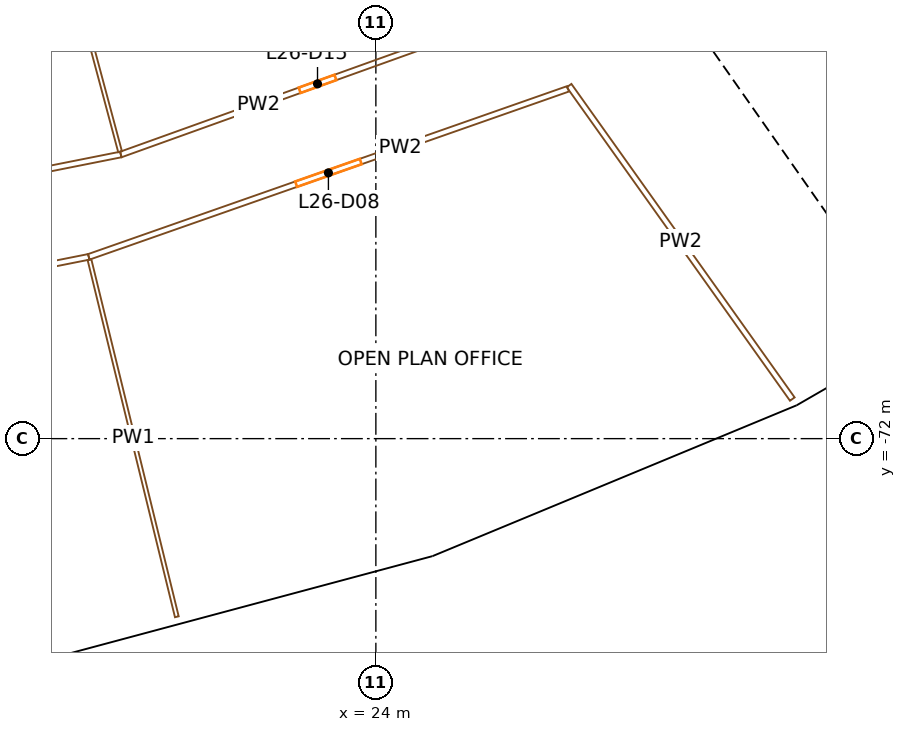
"""IFC4 building model, lengths in metres.
Left out: names, types, materials, properties, quantities, classifications, styles, units other than length and angle.
Written with IfcOpenShell. Run it as: python <this file> out.ifc"""

import sys

from ifc_helpers import new_model, si_unit, direction, frame, frame_2d, origin, origin_2d, place, context, subcontext, project, spatial, rectangle, extrude, element, fill, save


model = new_model("IFC4")
c1 = context("Model", 3, precision=1e-05, world=origin(), true_north=direction((0.0, 1.0)))
c2 = subcontext(c1, "Body", "Model", "MODEL_VIEW")
j1 = project(units=[si_unit("LENGTHUNIT", "METRE"), si_unit("PLANEANGLEUNIT", "RADIAN")], contexts=[c1])
p1 = place(None, origin())
s1 = spatial("IfcSite", under=j1, at=p1, CompositionType="ELEMENT")
p2 = place(p1, origin())
s2 = spatial("IfcBuilding", under=s1, at=p2, CompositionType="ELEMENT")
p3 = place(p2, frame((0.0, 0.0, 117.7)))
s3 = spatial("IfcBuildingStorey", under=s2, at=p3, CompositionType="ELEMENT", Elevation=117.7)
for number, where, z_axis, x_axis in (
    (1, (15.168, -76.256, 0.0), (0.0, 0.0, 1.0), (0.981, 0.195, 0.0)),
    (2, (24.992, -73.624, 0.0), (0.0, 0.0, 1.0), (0.947, 0.321, 0.0)),
    (3, (34.388, -69.732, 0.0), (0.0, 0.0, 1.0), (0.897, 0.442, 0.0)),
):
    element("IfcColumn", number, at=place(p3, frame(where, z_axis=z_axis, x_axis=x_axis)), inside=s3, PredefinedType="COLUMN", context=c2, shape_type="SweptSolid", body=[
        extrude(rectangle(XDim=1.2, YDim=1.5, at=origin_2d()), origin(), (0.0, 0.0, 1.0), 3.8),
    ])
p4 = place(p3, frame((36.717, -66.337, 0.0), z_axis=(0.0, 0.0, 1.0), x_axis=(-0.573577477574, 0.819151315216, 0.0)))
e4 = element("IfcWall", 4, at=p4, inside=s3, PredefinedType="SHEAR", context=c2, shape_type="SweptSolid", body=[
    extrude(rectangle(XDim=14.8, YDim=0.9, at=frame_2d((7.4, 0.0))), origin(), (0.0, 0.0, 1.0), 3.5),
])
p5 = place(p4, frame((6.2, 0.0, 0.0)))
e5 = element("IfcOpeningElement", 5, at=p5, cuts=e4, PredefinedType="OPENING", context=c2, shape_type="SweptSolid", body=[
    extrude(rectangle(XDim=2.4, YDim=2.1, at=frame_2d((1.2, 1.05))), frame((0.0, 0.46, 0.0), z_axis=(0.0, -1.0, 0.0), x_axis=(1.0, 0.0, 0.0)), (0.0, 0.0, 1.0), 0.92),
])
p6 = place(p3, frame((35.221, -63.417, 0.0), z_axis=(0.0, 0.0, 1.0), x_axis=(0.819166993208, 0.573555086491, 0.0)))
e6 = element("IfcWall", 6, at=p6, inside=s3, PredefinedType="SOLIDWALL", context=c2, shape_type="SweptSolid", body=[
    extrude(rectangle(XDim=7.95, YDim=0.3, at=frame_2d((3.975, 0.0))), origin(), (0.0, 0.0, 1.0), 3.5),
])
p7 = place(p3, frame((8.719, -66.229, 0.0), z_axis=(0.0, 0.0, 1.0), x_axis=(0.980786466832, 0.195084357342, 0.0)))
e7 = element("IfcWall", 7, at=p7, inside=s3, PredefinedType="PARTITIONING", context=c2, shape_type="SweptSolid", body=[
    extrude(rectangle(XDim=8.738, YDim=0.15, at=frame_2d((4.369, 0.0))), origin(), (0.0, 0.0, 1.0), 2.4),
])
p8 = place(p7, frame((3.869, 0.0, 0.0)))
e8 = element("IfcOpeningElement", 8, at=p8, cuts=e7, PredefinedType="OPENING", context=c2, shape_type="SweptSolid", body=[
    extrude(rectangle(XDim=1.0, YDim=2.1, at=frame_2d((0.5, 1.05))), frame((0.0, 0.085, 0.0), z_axis=(0.0, -1.0, 0.0), x_axis=(1.0, 0.0, 0.0)), (0.0, 0.0, 1.0), 0.17),
])
p9 = place(p3, frame((16.446, -67.217, 0.0), z_axis=(0.0, 0.0, 1.0), x_axis=(-0.980785582749, -0.195088802015, 0.0)))
e9 = element("IfcWall", 9, at=p9, inside=s3, PredefinedType="PARTITIONING", context=c2, shape_type="SweptSolid", body=[
    extrude(rectangle(XDim=6.033, YDim=0.15, at=frame_2d((3.017, 0.0))), origin(), (0.0, 0.0, 1.0), 2.4),
])
p10 = place(p9, frame((2.517, 0.0, 0.0)))
e10 = element("IfcOpeningElement", 10, at=p10, cuts=e9, PredefinedType="OPENING", context=c2, shape_type="SweptSolid", body=[
    extrude(rectangle(XDim=1.0, YDim=2.1, at=frame_2d((0.5, 1.05))), frame((0.0, 0.085, 0.0), z_axis=(0.0, -1.0, 0.0), x_axis=(1.0, 0.0, 0.0)), (0.0, 0.0, 1.0), 0.17),
])
p11 = place(p3, frame((14.747, -55.037, 0.0), z_axis=(0.0, 0.0, 1.0), x_axis=(0.258833329344, -0.965921998725, 0.0)))
e11 = element("IfcWall", 11, at=p11, inside=s3, PredefinedType="PARTITIONING", context=c2, shape_type="SweptSolid", body=[
    extrude(rectangle(XDim=9.746, YDim=0.1, at=frame_2d((4.873, 0.0))), origin(), (0.0, 0.0, 1.0), 2.4),
])
p12 = place(p3, frame((29.057, -62.796, 0.0), z_axis=(0.0, 0.0, 1.0), x_axis=(-0.943684765834, -0.330845980378, 0.0)))
e12 = element("IfcWall", 12, at=p12, inside=s3, PredefinedType="PARTITIONING", context=c2, shape_type="SweptSolid", body=[
    extrude(rectangle(XDim=13.363, YDim=0.15, at=frame_2d((6.682, 0.0))), origin(), (0.0, 0.0, 1.0), 2.4),
])
p13 = place(p12, frame((5.782, 0.0, 0.0)))
e13 = element("IfcOpeningElement", 13, at=p13, cuts=e12, PredefinedType="OPENING", context=c2, shape_type="SweptSolid", body=[
    extrude(rectangle(XDim=1.8, YDim=2.1, at=frame_2d((0.9, 1.05))), frame((0.0, 0.085, 0.0), z_axis=(0.0, -1.0, 0.0), x_axis=(1.0, 0.0, 0.0)), (0.0, 0.0, 1.0), 0.17),
])
p14 = place(p3, frame((17.289, -64.524, 0.0), z_axis=(0.0, 0.0, 1.0), x_axis=(0.941150861554, 0.337986768669, 0.0)))
e14 = element("IfcWall", 14, at=p14, inside=s3, PredefinedType="PARTITIONING", context=c2, shape_type="SweptSolid", body=[
    extrude(rectangle(XDim=10.998, YDim=0.15, at=frame_2d((5.499, 0.0))), origin(), (0.0, 0.0, 1.0), 2.4),
])
p15 = place(p14, frame((4.999, 0.0, 0.0)))
e15 = element("IfcOpeningElement", 15, at=p15, cuts=e14, PredefinedType="OPENING", context=c2, shape_type="SweptSolid", body=[
    extrude(rectangle(XDim=1.0, YDim=2.1, at=frame_2d((0.5, 1.05))), frame((0.0, 0.085, 0.0), z_axis=(0.0, -1.0, 0.0), x_axis=(1.0, 0.0, 0.0)), (0.0, 0.0, 1.0), 0.17),
])
p16 = place(p3, frame((18.763, -76.687, 0.0), z_axis=(0.0, 0.0, 1.0), x_axis=(-0.237657357205, 0.971349051869, 0.0)))
e16 = element("IfcWall", 16, at=p16, inside=s3, PredefinedType="PARTITIONING", context=c2, shape_type="SweptSolid", body=[
    extrude(rectangle(XDim=9.674, YDim=0.1, at=frame_2d((4.837, 0.0))), origin(), (0.0, 0.0, 1.0), 2.4),
])
p17 = place(p3, frame((29.084, -62.71, 0.0), z_axis=(0.0, 0.0, 1.0), x_axis=(0.580031092611, -0.814594335608, 0.0)))
e17 = element("IfcWall", 17, at=p17, inside=s3, PredefinedType="PARTITIONING", context=c2, shape_type="SweptSolid", body=[
    extrude(rectangle(XDim=10.126, YDim=0.15, at=frame_2d((5.063, 0.0))), origin(), (0.0, 0.0, 1.0), 2.4),
])
p18 = place(p13, origin())
e18 = element("IfcDoor", 18, at=p18, inside=s3, OperationType="DOUBLE_DOOR_SINGLE_SWING", PredefinedType="DOOR", context=c2, shape_type="SweptSolid", body=[
    extrude(rectangle(XDim=1.8, YDim=2.1, at=frame_2d((0.9, 1.05))), frame((0.0, 0.025, 0.0), z_axis=(0.0, -1.0, 0.0), x_axis=(1.0, 0.0, 0.0)), (0.0, 0.0, 1.0), 0.05),
])
fill(e13, e18)
p19 = place(p15, origin())
e19 = element("IfcDoor", 19, at=p19, inside=s3, OperationType="SINGLE_SWING_RIGHT", PredefinedType="DOOR", context=c2, shape_type="SweptSolid", body=[
    extrude(rectangle(XDim=1.0, YDim=2.1, at=frame_2d((0.5, 1.05))), frame((0.0, 0.025, 0.0), z_axis=(0.0, -1.0, 0.0), x_axis=(1.0, 0.0, 0.0)), (0.0, 0.0, 1.0), 0.05),
])
fill(e15, e19)
save(model, sys.argv[1])
